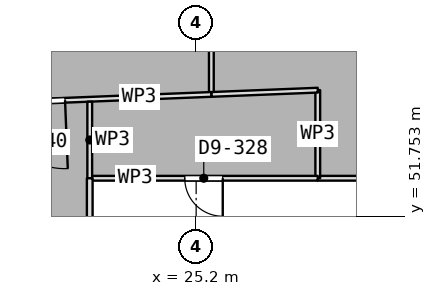
"""IFC4 building model, lengths in metres.
Left out: names, types, materials, properties, quantities, classifications, styles, units other than length and angle.
Written with IfcOpenShell. Run it as: python <this file> out.ifc"""

import sys

from ifc_helpers import new_model, si_unit, direction, frame, frame_2d, origin, place, context, subcontext, project, spatial, rectangle, extrude, element, fill, save


model = new_model("IFC4")
c1 = context("Model", 3, precision=1e-05, world=origin(), true_north=direction((0.0, 1.0)))
c2 = subcontext(c1, "Body", "Model", "MODEL_VIEW")
j1 = project(units=[si_unit("LENGTHUNIT", "METRE"), si_unit("PLANEANGLEUNIT", "RADIAN")], contexts=[c1])
p1 = place(None, origin())
s1 = spatial("IfcSite", under=j1, at=p1, CompositionType="ELEMENT")
p2 = place(p1, origin())
s2 = spatial("IfcBuilding", under=s1, at=p2, CompositionType="ELEMENT")
p3 = place(p2, frame((0.0, 0.0, 99.05)))
s3 = spatial("IfcBuildingStorey", under=s2, at=p3, CompositionType="ELEMENT", Elevation=99.05)
p4 = place(p3, frame((25.6, 54.956, 0.0), z_axis=(0.0, 0.0, 1.0), x_axis=(0.0, 1.0, 0.0)))
e1 = element("IfcWall", 1, at=p4, inside=s3, PredefinedType="PARTITIONING", context=c2, shape_type="SweptSolid", body=[
    extrude(rectangle(XDim=2.974, YDim=0.125, at=frame_2d((1.487, 0.0))), origin(), (0.0, 0.0, 1.0), 3.5),
])
p5 = place(p3, frame((33.826, 52.75, 0.0), z_axis=(0.0, 0.0, 1.0), x_axis=(-1.0, 0.0, 0.0)))
e2 = element("IfcWall", 2, at=p5, inside=s3, PredefinedType="PARTITIONING", context=c2, shape_type="SweptSolid", body=[
    extrude(rectangle(XDim=5.426, YDim=0.125, at=frame_2d((2.713, 0.0))), origin(), (0.0, 0.0, 1.0), 3.5),
])
p6 = place(p5, frame((1.813, 0.0, 0.0)))
e3 = element("IfcOpeningElement", 3, at=p6, cuts=e2, PredefinedType="OPENING", context=c2, shape_type="SweptSolid", body=[
    extrude(rectangle(XDim=1.8, YDim=2.1, at=frame_2d((0.9, 1.05))), frame((0.0, 0.073, 0.0), z_axis=(0.0, -1.0, 0.0), x_axis=(1.0, 0.0, 0.0)), (0.0, 0.0, 1.0), 0.145),
])
p7 = place(p3, frame((28.4, 52.75, 0.0), z_axis=(0.0, 0.0, 1.0), x_axis=(0.0, 1.0, 0.0)))
e4 = element("IfcWall", 4, at=p7, inside=s3, PredefinedType="PARTITIONING", context=c2, shape_type="SweptSolid", body=[
    extrude(rectangle(XDim=2.318, YDim=0.125, at=frame_2d((1.159, 0.0))), origin(), (0.0, 0.0, 1.0), 3.5),
])
p8 = place(p3, frame((28.4, 55.068, 0.0), z_axis=(0.0, 0.0, 1.0), x_axis=(-0.999199984134, -0.039992395598, 0.0)))
e5 = element("IfcWall", 5, at=p8, inside=s3, PredefinedType="PARTITIONING", context=c2, shape_type="SweptSolid", body=[
    extrude(rectangle(XDim=2.802, YDim=0.125, at=frame_2d((1.401, 0.0))), origin(), (0.0, 0.0, 1.0), 3.5),
])
p9 = place(p3, frame((25.599, 54.956, 0.0), z_axis=(0.0, 0.0, 1.0), x_axis=(-0.999199932579, -0.039993683677, 0.0)))
e6 = element("IfcWall", 6, at=p9, inside=s3, PredefinedType="PARTITIONING", context=c2, shape_type="SweptSolid", body=[
    extrude(rectangle(XDim=9.505, YDim=0.125, at=frame_2d((4.752, 0.0))), origin(), (0.0, 0.0, 1.0), 3.5),
])
p10 = place(p9, frame((3.852, 0.0, 0.0)))
e7 = element("IfcOpeningElement", 7, at=p10, cuts=e6, PredefinedType="OPENING", context=c2, shape_type="SweptSolid", body=[
    extrude(rectangle(XDim=1.8, YDim=2.1, at=frame_2d((0.9, 1.05))), frame((0.0, 0.073, 0.0), z_axis=(0.0, -1.0, 0.0), x_axis=(1.0, 0.0, 0.0)), (0.0, 0.0, 1.0), 0.145),
])
p11 = place(p3, frame((28.4, 52.75, 0.0), z_axis=(0.0, 0.0, 1.0), x_axis=(-1.0, 0.0, 0.0)))
e8 = element("IfcWall", 8, at=p11, inside=s3, PredefinedType="PARTITIONING", context=c2, shape_type="SweptSolid", body=[
    extrude(rectangle(XDim=6.0, YDim=0.125, at=frame_2d((3.0, 0.0))), origin(), (0.0, 0.0, 1.0), 3.5),
])
p12 = place(p11, frame((2.5, 0.0, 0.0)))
e9 = element("IfcOpeningElement", 9, at=p12, cuts=e8, PredefinedType="OPENING", context=c2, shape_type="SweptSolid", body=[
    extrude(rectangle(XDim=1.0, YDim=2.1, at=frame_2d((0.5, 1.05))), frame((0.0, 0.073, 0.0), z_axis=(0.0, -1.0, 0.0), x_axis=(1.0, 0.0, 0.0)), (0.0, 0.0, 1.0), 0.145),
])
p13 = place(p3, frame((22.4, 52.75, 0.0), z_axis=(0.0, 0.0, 1.0), x_axis=(0.0, 1.0, 0.0)))
e10 = element("IfcWall", 10, at=p13, inside=s3, PredefinedType="PARTITIONING", context=c2, shape_type="SweptSolid", body=[
    extrude(rectangle(XDim=2.015, YDim=0.125, at=frame_2d((1.007, 0.0))), origin(), (0.0, 0.0, 1.0), 3.5),
])
p14 = place(p3, frame((22.4, 52.75, 0.0), z_axis=(0.0, 0.0, 1.0), x_axis=(0.0, -1.0, 0.0)))
e11 = element("IfcWall", 11, at=p14, inside=s3, PredefinedType="PARTITIONING", context=c2, shape_type="SweptSolid", body=[
    extrude(rectangle(XDim=17.406, YDim=0.15, at=frame_2d((8.703, 0.0))), origin(), (0.0, 0.0, 1.0), 3.5),
])
p15 = place(p14, frame((8.203, 0.0, 0.0)))
e12 = element("IfcOpeningElement", 12, at=p15, cuts=e11, PredefinedType="OPENING", context=c2, shape_type="SweptSolid", body=[
    extrude(rectangle(XDim=1.0, YDim=2.1, at=frame_2d((0.5, 1.05))), frame((0.0, 0.085, 0.0), z_axis=(0.0, -1.0, 0.0), x_axis=(1.0, 0.0, 0.0)), (0.0, 0.0, 1.0), 0.17),
])
p16 = place(p10, origin())
e13 = element("IfcDoor", 13, at=p16, inside=s3, OperationType="DOUBLE_DOOR_SINGLE_SWING", PredefinedType="DOOR", context=c2, shape_type="SweptSolid", body=[
    extrude(rectangle(XDim=1.8, YDim=2.1, at=frame_2d((0.9, 1.05))), frame((0.0, 0.025, 0.0), z_axis=(0.0, -1.0, 0.0), x_axis=(1.0, 0.0, 0.0)), (0.0, 0.0, 1.0), 0.05),
])
fill(e7, e13)
p17 = place(p12, origin())
e14 = element("IfcDoor", 14, at=p17, inside=s3, OperationType="SINGLE_SWING_LEFT", PredefinedType="DOOR", context=c2, shape_type="SweptSolid", body=[
    extrude(rectangle(XDim=1.0, YDim=2.1, at=frame_2d((0.5, 1.05))), frame((0.0, 0.025, 0.0), z_axis=(0.0, -1.0, 0.0), x_axis=(1.0, 0.0, 0.0)), (0.0, 0.0, 1.0), 0.05),
])
fill(e9, e14)
save(model, sys.argv[1])
